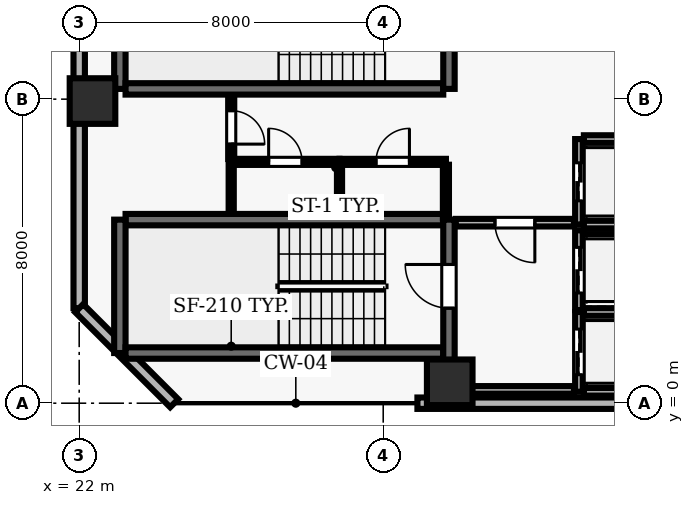
"""IFC4 building model, lengths in metres.
Left out: names, types, materials, properties, quantities, classifications, styles, units other than length and angle.
Written with IfcOpenShell. Run it as: python <this file> out.ifc"""

import sys

from ifc_helpers import new_model, si_unit, direction, frame, frame_2d, origin, origin_2d, place, context, subcontext, project, spatial, rectangle, extrude, element, fill, save


model = new_model("IFC4")
c1 = context("Model", 3, precision=1e-05, world=origin(), true_north=direction((0.0, 1.0)))
c2 = subcontext(c1, "Body", "Model", "MODEL_VIEW")
j1 = project(units=[si_unit("LENGTHUNIT", "METRE"), si_unit("PLANEANGLEUNIT", "RADIAN")], contexts=[c1])
p1 = place(None, origin())
s1 = spatial("IfcSite", under=j1, at=p1, CompositionType="ELEMENT")
p2 = place(p1, origin())
s2 = spatial("IfcBuilding", under=s1, at=p2, CompositionType="ELEMENT")
p3 = place(p2, frame((0.0, 0.0, 119.0)))
s3 = spatial("IfcBuildingStorey", under=s2, at=p3, CompositionType="ELEMENT", Elevation=119.0)
for number, where, z_axis, x_axis in (
    (1, (31.75, 0.55, 0.0), (0.0, 0.0, 1.0), (1.0, 0.0, 0.0)),
    (2, (22.35, 7.95, 0.0), (0.0, 0.0, 1.0), (1.0, 0.0, 0.0)),
):
    element("IfcColumn", number, at=place(p3, frame(where, z_axis=z_axis, x_axis=x_axis)), inside=s3, PredefinedType="COLUMN", context=c2, shape_type="SweptSolid", body=[
        extrude(rectangle(XDim=1.2, YDim=1.2, at=origin_2d()), origin(), (0.0, 0.0, 1.0), 3.9),
    ])
p4 = place(p3, frame((30.9, 0.0, 0.0), z_axis=(0.0, 0.0, 1.0), x_axis=(1.0, 0.0, 0.0)))
e3 = element("IfcWall", 3, at=p4, inside=s3, PredefinedType="SOLIDWALL", context=c2, shape_type="SweptSolid", body=[
    extrude(rectangle(XDim=7.6, YDim=0.3, at=frame_2d((3.8, 0.0))), origin(), (0.0, 0.0, 1.0), 3.69),
])
p5 = place(p3, frame((22.0, 46.1, 0.0), z_axis=(0.0, 0.0, 1.0), x_axis=(0.0, -1.0, 0.0)))
e4 = element("IfcWall", 4, at=p5, inside=s3, PredefinedType="SOLIDWALL", context=c2, shape_type="SweptSolid", body=[
    extrude(rectangle(XDim=43.6, YDim=0.3, at=frame_2d((21.8, 0.0))), origin(), (0.0, 0.0, 1.0), 3.69),
])
p6 = place(p5, frame((12.7, 0.0, 0.0)))
e5 = element("IfcOpeningElement", 5, at=p6, cuts=e4, PredefinedType="OPENING", context=c2, shape_type="SweptSolid", body=[
    extrude(rectangle(XDim=1.0, YDim=2.2, at=frame_2d((0.5, 1.1))), frame((0.0, 0.16, 0.0), z_axis=(0.0, -1.0, 0.0), x_axis=(1.0, 0.0, 0.0)), (0.0, 0.0, 1.0), 0.32),
])
p7 = place(p5, frame((16.975, 0.0, 0.9)))
e6 = element("IfcOpeningElement", 6, at=p7, cuts=e4, PredefinedType="OPENING", context=c2, shape_type="SweptSolid", body=[
    extrude(rectangle(XDim=2.4, YDim=1.6, at=frame_2d((1.2, 0.8))), frame((0.0, 0.16, 0.0), z_axis=(0.0, -1.0, 0.0), x_axis=(1.0, 0.0, 0.0)), (0.0, 0.0, 1.0), 0.32),
])
p8 = place(p5, frame((23.775, 0.0, 0.9)))
e7 = element("IfcOpeningElement", 7, at=p8, cuts=e4, PredefinedType="OPENING", context=c2, shape_type="SweptSolid", body=[
    extrude(rectangle(XDim=2.4, YDim=1.6, at=frame_2d((1.2, 0.8))), frame((0.0, 0.16, 0.0), z_axis=(0.0, -1.0, 0.0), x_axis=(1.0, 0.0, 0.0)), (0.0, 0.0, 1.0), 0.32),
])
p9 = place(p5, frame((27.875, 0.0, 0.9)))
e8 = element("IfcOpeningElement", 8, at=p9, cuts=e4, PredefinedType="OPENING", context=c2, shape_type="SweptSolid", body=[
    extrude(rectangle(XDim=2.4, YDim=1.6, at=frame_2d((1.2, 0.8))), frame((0.0, 0.16, 0.0), z_axis=(0.0, -1.0, 0.0), x_axis=(1.0, 0.0, 0.0)), (0.0, 0.0, 1.0), 0.32),
])
p10 = place(p5, frame((34.225, 0.0, 0.9)))
e9 = element("IfcOpeningElement", 9, at=p10, cuts=e4, PredefinedType="OPENING", context=c2, shape_type="SweptSolid", body=[
    extrude(rectangle(XDim=2.4, YDim=1.6, at=frame_2d((1.2, 0.8))), frame((0.0, 0.16, 0.0), z_axis=(0.0, -1.0, 0.0), x_axis=(1.0, 0.0, 0.0)), (0.0, 0.0, 1.0), 0.32),
])
p11 = place(p3, frame((22.0, 2.5, 0.0), z_axis=(0.0, 0.0, 1.0), x_axis=(0.707106781187, -0.707106781187, 0.0)))
e10 = element("IfcWall", 10, at=p11, inside=s3, PredefinedType="SOLIDWALL", context=c2, shape_type="SweptSolid", body=[
    extrude(rectangle(XDim=3.536, YDim=0.3, at=frame_2d((1.768, 0.0))), origin(), (0.0, 0.0, 1.0), 3.69),
])
p12 = place(p3, frame((31.58, 4.83, 0.0), z_axis=(0.0, 0.0, 1.0), x_axis=(-1.0, 0.0, 0.0)))
e11 = element("IfcWall", 11, at=p12, inside=s3, PredefinedType="SHEAR", context=c2, shape_type="SweptSolid", body=[
    extrude(rectangle(XDim=8.36, YDim=0.3, at=frame_2d((4.18, 0.0))), origin(), (0.0, 0.0, 1.0), 3.69),
])
p13 = place(p3, frame((23.07, 4.83, 0.0), z_axis=(0.0, 0.0, 1.0), x_axis=(0.0, -1.0, 0.0)))
e12 = element("IfcWall", 12, at=p13, inside=s3, PredefinedType="SHEAR", context=c2, shape_type="SweptSolid", body=[
    extrude(rectangle(XDim=3.51, YDim=0.3, at=frame_2d((1.755, 0.0))), origin(), (0.0, 0.0, 1.0), 3.69),
])
p14 = place(p3, frame((23.22, 1.32, 0.0), z_axis=(0.0, 0.0, 1.0), x_axis=(1.0, 0.0, 0.0)))
e13 = element("IfcWall", 13, at=p14, inside=s3, PredefinedType="SHEAR", context=c2, shape_type="SweptSolid", body=[
    extrude(rectangle(XDim=8.36, YDim=0.3, at=frame_2d((4.18, 0.0))), origin(), (0.0, 0.0, 1.0), 3.69),
])
p15 = place(p3, frame((31.73, 0.96, 0.0), z_axis=(0.0, 0.0, 1.0), x_axis=(0.0, 1.0, 0.0)))
e14 = element("IfcWall", 14, at=p15, inside=s3, PredefinedType="SHEAR", context=c2, shape_type="SweptSolid", body=[
    extrude(rectangle(XDim=3.87, YDim=0.3, at=frame_2d((1.935, 0.0))), origin(), (0.0, 0.0, 1.0), 3.69),
])
p16 = place(p15, frame((1.54, 0.0, 0.0)))
e15 = element("IfcOpeningElement", 15, at=p16, cuts=e14, PredefinedType="OPENING", context=c2, shape_type="SweptSolid", body=[
    extrude(rectangle(XDim=1.15, YDim=2.15, at=frame_2d((0.575, 1.075))), frame((0.0, 0.16, 0.0), z_axis=(0.0, -1.0, 0.0), x_axis=(1.0, 0.0, 0.0)), (0.0, 0.0, 1.0), 0.32),
])
p17 = place(p3, frame((23.07, 11.78, 0.0), z_axis=(0.0, 0.0, 1.0), x_axis=(0.0, -1.0, 0.0)))
e16 = element("IfcWall", 16, at=p17, inside=s3, PredefinedType="SHEAR", context=c2, shape_type="SweptSolid", body=[
    extrude(rectangle(XDim=3.51, YDim=0.3, at=frame_2d((1.755, 0.0))), origin(), (0.0, 0.0, 1.0), 3.69),
])
p18 = place(p3, frame((23.22, 8.27, 0.0), z_axis=(0.0, 0.0, 1.0), x_axis=(1.0, 0.0, 0.0)))
e17 = element("IfcWall", 17, at=p18, inside=s3, PredefinedType="SHEAR", context=c2, shape_type="SweptSolid", body=[
    extrude(rectangle(XDim=8.36, YDim=0.3, at=frame_2d((4.18, 0.0))), origin(), (0.0, 0.0, 1.0), 3.69),
])
p19 = place(p3, frame((31.73, 8.27, 0.0), z_axis=(0.0, 0.0, 1.0), x_axis=(0.0, 1.0, 0.0)))
e18 = element("IfcWall", 18, at=p19, inside=s3, PredefinedType="SHEAR", context=c2, shape_type="SweptSolid", body=[
    extrude(rectangle(XDim=3.51, YDim=0.3, at=frame_2d((1.755, 0.0))), origin(), (0.0, 0.0, 1.0), 3.69),
])
p20 = place(p19, frame((1.18, 0.0, 0.0)))
e19 = element("IfcOpeningElement", 19, at=p20, cuts=e18, PredefinedType="OPENING", context=c2, shape_type="SweptSolid", body=[
    extrude(rectangle(XDim=1.15, YDim=2.15, at=frame_2d((0.575, 1.075))), frame((0.0, 0.16, 0.0), z_axis=(0.0, -1.0, 0.0), x_axis=(1.0, 0.0, 0.0)), (0.0, 0.0, 1.0), 0.32),
])
p21 = place(p3, frame((35.15, 2.4, 0.0), z_axis=(0.0, 0.0, 1.0), x_axis=(0.0, -1.0, 0.0)))
e20 = element("IfcWall", 20, at=p21, inside=s3, PredefinedType="SOLIDWALL", context=c2, shape_type="SweptSolid", body=[
    extrude(rectangle(XDim=2.1, YDim=0.2, at=frame_2d((1.05, 0.0))), origin(), (0.0, 0.0, 1.0), 3.69),
])
p22 = place(p21, frame((0.45, 0.0, 0.0)))
e21 = element("IfcOpeningElement", 21, at=p22, cuts=e20, PredefinedType="OPENING", context=c2, shape_type="SweptSolid", body=[
    extrude(rectangle(XDim=1.2, YDim=2.15, at=frame_2d((0.6, 1.075))), frame((0.0, 0.11, 0.0), z_axis=(0.0, -1.0, 0.0), x_axis=(1.0, 0.0, 0.0)), (0.0, 0.0, 1.0), 0.22),
])
for number, where, z_axis, x_axis in (
    (22, (35.28, 0.3, 0.0), (0.0, 0.0, 1.0), (1.0, 0.0, 0.0)),
    (23, (37.42, 2.4, 0.0), (0.0, 0.0, 1.0), (-1.0, 0.0, 0.0)),
):
    element("IfcWall", number, at=place(p3, frame(where, z_axis=z_axis, x_axis=x_axis)), inside=s3, PredefinedType="SOLIDWALL", context=c2, shape_type="SweptSolid", body=[
        extrude(rectangle(XDim=2.14, YDim=0.2, at=frame_2d((1.07, 0.0))), origin(), (0.0, 0.0, 1.0), 3.69),
    ])
p23 = place(p3, frame((35.15, 4.55, 0.0), z_axis=(0.0, 0.0, 1.0), x_axis=(0.0, -1.0, 0.0)))
e24 = element("IfcWall", 24, at=p23, inside=s3, PredefinedType="SOLIDWALL", context=c2, shape_type="SweptSolid", body=[
    extrude(rectangle(XDim=2.1, YDim=0.2, at=frame_2d((1.05, 0.0))), origin(), (0.0, 0.0, 1.0), 3.69),
])
p24 = place(p23, frame((0.45, 0.0, 0.0)))
e25 = element("IfcOpeningElement", 25, at=p24, cuts=e24, PredefinedType="OPENING", context=c2, shape_type="SweptSolid", body=[
    extrude(rectangle(XDim=1.2, YDim=2.15, at=frame_2d((0.6, 1.075))), frame((0.0, 0.11, 0.0), z_axis=(0.0, -1.0, 0.0), x_axis=(1.0, 0.0, 0.0)), (0.0, 0.0, 1.0), 0.22),
])
p25 = place(p3, frame((37.42, 4.55, 0.0), z_axis=(0.0, 0.0, 1.0), x_axis=(-1.0, 0.0, 0.0)))
e26 = element("IfcWall", 26, at=p25, inside=s3, PredefinedType="SOLIDWALL", context=c2, shape_type="SweptSolid", body=[
    extrude(rectangle(XDim=2.14, YDim=0.2, at=frame_2d((1.07, 0.0))), origin(), (0.0, 0.0, 1.0), 3.69),
])
p26 = place(p3, frame((35.15, 6.95, 0.0), z_axis=(0.0, 0.0, 1.0), x_axis=(0.0, -1.0, 0.0)))
e27 = element("IfcWall", 27, at=p26, inside=s3, PredefinedType="SOLIDWALL", context=c2, shape_type="SweptSolid", body=[
    extrude(rectangle(XDim=2.25, YDim=0.2, at=frame_2d((1.125, 0.0))), origin(), (0.0, 0.0, 1.0), 3.69),
])
p27 = place(p26, frame((0.625, 0.0, 0.0)))
e28 = element("IfcOpeningElement", 28, at=p27, cuts=e27, PredefinedType="OPENING", context=c2, shape_type="SweptSolid", body=[
    extrude(rectangle(XDim=1.0, YDim=2.1, at=frame_2d((0.5, 1.05))), frame((0.0, 0.11, 0.0), z_axis=(0.0, -1.0, 0.0), x_axis=(1.0, 0.0, 0.0)), (0.0, 0.0, 1.0), 0.22),
])
for number, where, z_axis, x_axis in (
    (29, (35.28, 4.7, 0.0), (0.0, 0.0, 1.0), (1.0, 0.0, 0.0)),
    (30, (37.42, 6.95, 0.0), (0.0, 0.0, 1.0), (-1.0, 0.0, 0.0)),
):
    element("IfcWall", number, at=place(p3, frame(where, z_axis=z_axis, x_axis=x_axis)), inside=s3, PredefinedType="SOLIDWALL", context=c2, shape_type="SweptSolid", body=[
        extrude(rectangle(XDim=2.14, YDim=0.2, at=frame_2d((1.07, 0.0))), origin(), (0.0, 0.0, 1.0), 3.69),
    ])
p28 = place(p3, frame((26.0, 6.35, 0.0), z_axis=(0.0, 0.0, 1.0), x_axis=(1.0, 0.0, 0.0)))
e31 = element("IfcWall", 31, at=p28, inside=s3, PredefinedType="PARTITIONING", context=c2, shape_type="SweptSolid", body=[
    extrude(rectangle(XDim=2.85, YDim=0.16, at=frame_2d((1.425, 0.0))), origin(), (0.0, 0.0, 1.0), 3.69),
])
p29 = place(p28, frame((0.985, 0.0, 0.0)))
e32 = element("IfcOpeningElement", 32, at=p29, cuts=e31, PredefinedType="OPENING", context=c2, shape_type="SweptSolid", body=[
    extrude(rectangle(XDim=0.88, YDim=2.1, at=frame_2d((0.44, 1.05))), frame((0.0, 0.09, 0.0), z_axis=(0.0, -1.0, 0.0), x_axis=(1.0, 0.0, 0.0)), (0.0, 0.0, 1.0), 0.18),
])
p30 = place(p3, frame((28.85, 6.35, 0.0), z_axis=(0.0, 0.0, 1.0), x_axis=(1.0, 0.0, 0.0)))
e33 = element("IfcWall", 33, at=p30, inside=s3, PredefinedType="PARTITIONING", context=c2, shape_type="SweptSolid", body=[
    extrude(rectangle(XDim=2.8, YDim=0.16, at=frame_2d((1.4, 0.0))), origin(), (0.0, 0.0, 1.0), 3.69),
])
p31 = place(p30, frame((0.96, 0.0, 0.0)))
e34 = element("IfcOpeningElement", 34, at=p31, cuts=e33, PredefinedType="OPENING", context=c2, shape_type="SweptSolid", body=[
    extrude(rectangle(XDim=0.88, YDim=2.1, at=frame_2d((0.44, 1.05))), frame((0.0, 0.09, 0.0), z_axis=(0.0, -1.0, 0.0), x_axis=(1.0, 0.0, 0.0)), (0.0, 0.0, 1.0), 0.18),
])
p32 = place(p3, frame((31.65, 0.35, 0.0), z_axis=(0.0, 0.0, 1.0), x_axis=(1.0, 0.0, 0.0)))
e35 = element("IfcWall", 35, at=p32, inside=s3, PredefinedType="SOLIDWALL", context=c2, shape_type="SweptSolid", body=[
    extrude(rectangle(XDim=3.37, YDim=0.2, at=frame_2d((1.685, 0.0))), origin(), (0.0, 0.0, 1.0), 3.69),
])
p33 = place(p3, frame((35.02, 4.75, 0.0), z_axis=(0.0, 0.0, 1.0), x_axis=(-1.0, 0.0, 0.0)))
e36 = element("IfcWall", 36, at=p33, inside=s3, PredefinedType="SOLIDWALL", context=c2, shape_type="SweptSolid", body=[
    extrude(rectangle(XDim=3.11, YDim=0.2, at=frame_2d((1.555, 0.0))), origin(), (0.0, 0.0, 1.0), 3.69),
])
p34 = place(p33, frame((1.03, 0.0, 0.0)))
e37 = element("IfcOpeningElement", 37, at=p34, cuts=e36, PredefinedType="OPENING", context=c2, shape_type="SweptSolid", body=[
    extrude(rectangle(XDim=1.05, YDim=2.15, at=frame_2d((0.525, 1.075))), frame((0.0, 0.11, 0.0), z_axis=(0.0, -1.0, 0.0), x_axis=(1.0, 0.0, 0.0)), (0.0, 0.0, 1.0), 0.22),
])
p35 = place(p3, frame((26.0, 5.01, 0.0), z_axis=(0.0, 0.0, 1.0), x_axis=(0.0, 1.0, 0.0)))
e38 = element("IfcWall", 38, at=p35, inside=s3, PredefinedType="PARTITIONING", context=c2, shape_type="SweptSolid", body=[
    extrude(rectangle(XDim=1.265, YDim=0.135, at=frame_2d((0.632, 0.0))), origin(), (0.0, 0.0, 1.0), 3.69),
])
p36 = place(p3, frame((26.0, 8.09, 0.0), z_axis=(0.0, 0.0, 1.0), x_axis=(0.0, -1.0, 0.0)))
e39 = element("IfcWall", 39, at=p36, inside=s3, PredefinedType="PARTITIONING", context=c2, shape_type="SweptSolid", body=[
    extrude(rectangle(XDim=1.665, YDim=0.16, at=frame_2d((0.833, 0.0))), origin(), (0.0, 0.0, 1.0), 3.69),
])
p37 = place(p36, frame((0.393, 0.0, 0.0)))
e40 = element("IfcOpeningElement", 40, at=p37, cuts=e39, PredefinedType="OPENING", context=c2, shape_type="SweptSolid", body=[
    extrude(rectangle(XDim=0.88, YDim=2.1, at=frame_2d((0.44, 1.05))), frame((0.0, 0.09, 0.0), z_axis=(0.0, -1.0, 0.0), x_axis=(1.0, 0.0, 0.0)), (0.0, 0.0, 1.0), 0.18),
])
p38 = place(p3, frame((28.85, 5.01, 0.0), z_axis=(0.0, 0.0, 1.0), x_axis=(0.0, 1.0, 0.0)))
e41 = element("IfcWall", 41, at=p38, inside=s3, PredefinedType="PARTITIONING", context=c2, shape_type="SweptSolid", body=[
    extrude(rectangle(XDim=1.265, YDim=0.135, at=frame_2d((0.632, 0.0))), origin(), (0.0, 0.0, 1.0), 3.69),
])
p39 = place(p3, frame((31.65, 4.86, 0.0), z_axis=(0.0, 0.0, 1.0), x_axis=(0.0, 1.0, 0.0)))
e42 = element("IfcWall", 42, at=p39, inside=s3, PredefinedType="PARTITIONING", context=c2, shape_type="SweptSolid", body=[
    extrude(rectangle(XDim=1.415, YDim=0.16, at=frame_2d((0.708, 0.0))), origin(), (0.0, 0.0, 1.0), 3.69),
])
p40 = place(p16, origin())
e43 = element("IfcDoor", 43, at=p40, inside=s3, OperationType="SINGLE_SWING_RIGHT", PredefinedType="DOOR", context=c2, shape_type="SweptSolid", body=[
    extrude(rectangle(XDim=1.15, YDim=2.15, at=frame_2d((0.575, 1.075))), frame((0.0, 0.025, 0.0), z_axis=(0.0, -1.0, 0.0), x_axis=(1.0, 0.0, 0.0)), (0.0, 0.0, 1.0), 0.05),
])
fill(e15, e43)
p41 = place(p22, origin())
e44 = element("IfcDoor", 44, at=p41, inside=s3, OperationType="DOUBLE_DOOR_SLIDING", PredefinedType="DOOR", context=c2, shape_type="SweptSolid", body=[
    extrude(rectangle(XDim=1.2, YDim=2.15, at=frame_2d((0.6, 1.075))), frame((0.0, 0.025, 0.0), z_axis=(0.0, -1.0, 0.0), x_axis=(1.0, 0.0, 0.0)), (0.0, 0.0, 1.0), 0.05),
])
fill(e21, e44)
p42 = place(p24, origin())
e45 = element("IfcDoor", 45, at=p42, inside=s3, OperationType="DOUBLE_DOOR_SLIDING", PredefinedType="DOOR", context=c2, shape_type="SweptSolid", body=[
    extrude(rectangle(XDim=1.2, YDim=2.15, at=frame_2d((0.6, 1.075))), frame((0.0, 0.025, 0.0), z_axis=(0.0, -1.0, 0.0), x_axis=(1.0, 0.0, 0.0)), (0.0, 0.0, 1.0), 0.05),
])
fill(e25, e45)
p43 = place(p27, origin())
e46 = element("IfcDoor", 46, at=p43, inside=s3, OperationType="DOUBLE_DOOR_SLIDING", PredefinedType="DOOR", context=c2, shape_type="SweptSolid", body=[
    extrude(rectangle(XDim=1.0, YDim=2.1, at=frame_2d((0.5, 1.05))), frame((0.0, 0.025, 0.0), z_axis=(0.0, -1.0, 0.0), x_axis=(1.0, 0.0, 0.0)), (0.0, 0.0, 1.0), 0.05),
])
fill(e28, e46)
p44 = place(p34, origin())
e47 = element("IfcDoor", 47, at=p44, inside=s3, OperationType="SINGLE_SWING_LEFT", PredefinedType="DOOR", context=c2, shape_type="SweptSolid", body=[
    extrude(rectangle(XDim=1.05, YDim=2.15, at=frame_2d((0.525, 1.075))), frame((0.0, 0.025, 0.0), z_axis=(0.0, -1.0, 0.0), x_axis=(1.0, 0.0, 0.0)), (0.0, 0.0, 1.0), 0.05),
])
fill(e37, e47)
p45 = place(p37, origin())
e48 = element("IfcDoor", 48, at=p45, inside=s3, OperationType="SINGLE_SWING_RIGHT", PredefinedType="DOOR", context=c2, shape_type="SweptSolid", body=[
    extrude(rectangle(XDim=0.88, YDim=2.1, at=frame_2d((0.44, 1.05))), frame((0.0, 0.025, 0.0), z_axis=(0.0, -1.0, 0.0), x_axis=(1.0, 0.0, 0.0)), (0.0, 0.0, 1.0), 0.05),
])
fill(e40, e48)
p46 = place(p29, origin())
e49 = element("IfcDoor", 49, at=p46, inside=s3, OperationType="SINGLE_SWING_LEFT", PredefinedType="DOOR", context=c2, shape_type="SweptSolid", body=[
    extrude(rectangle(XDim=0.88, YDim=2.1, at=frame_2d((0.44, 1.05))), frame((0.0, 0.025, 0.0), z_axis=(0.0, -1.0, 0.0), x_axis=(1.0, 0.0, 0.0)), (0.0, 0.0, 1.0), 0.05),
])
fill(e32, e49)
p47 = place(p31, origin())
e50 = element("IfcDoor", 50, at=p47, inside=s3, OperationType="SINGLE_SWING_RIGHT", PredefinedType="DOOR", context=c2, shape_type="SweptSolid", body=[
    extrude(rectangle(XDim=0.88, YDim=2.1, at=frame_2d((0.44, 1.05))), frame((0.0, 0.025, 0.0), z_axis=(0.0, -1.0, 0.0), x_axis=(1.0, 0.0, 0.0)), (0.0, 0.0, 1.0), 0.05),
])
fill(e34, e50)
save(model, sys.argv[1])
